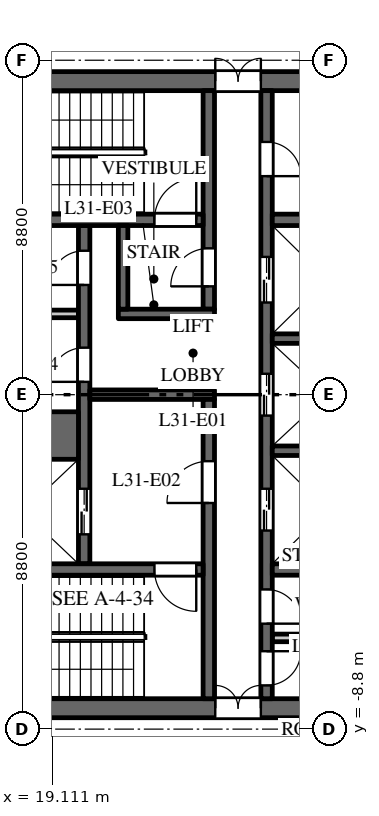
"""IFC4 building model, lengths in metres.
Left out: names, types, materials, properties, quantities, classifications, styles, units other than length and angle.
Written with IfcOpenShell. Run it as: python <this file> out.ifc"""

import sys

from ifc_helpers import new_model, si_unit, direction, frame, frame_2d, origin, place, context, subcontext, project, spatial, rectangle, extrude, element, fill, save


model = new_model("IFC4")
c1 = context("Model", 3, precision=1e-05, world=origin(), true_north=direction((0.0, 1.0)))
c2 = subcontext(c1, "Body", "Model", "MODEL_VIEW")
j1 = project(units=[si_unit("LENGTHUNIT", "METRE"), si_unit("PLANEANGLEUNIT", "RADIAN")], contexts=[c1])
p1 = place(None, origin())
s1 = spatial("IfcSite", under=j1, at=p1, CompositionType="ELEMENT")
p2 = place(p1, origin())
s2 = spatial("IfcBuilding", under=s1, at=p2, CompositionType="ELEMENT")
p3 = place(p2, frame((0.0, 0.0, 136.0)))
s3 = spatial("IfcBuildingStorey", under=s2, at=p3, CompositionType="ELEMENT", Elevation=136.0)
p4 = place(p3, frame((16.5, 8.25, 0.0), z_axis=(0.0, 0.0, 1.0), x_axis=(1.0, 0.0, 0.0)))
e1 = element("IfcWall", 1, at=p4, inside=s3, PredefinedType="SHEAR", context=c2, shape_type="SweptSolid", body=[
    extrude(rectangle(XDim=15.0, YDim=0.5, at=frame_2d((7.5, 0.0))), origin(), (0.0, 0.0, 1.0), 3.7),
])
p5 = place(p4, frame((6.9, 0.0, 0.0)))
e2 = element("IfcOpeningElement", 2, at=p5, cuts=e1, PredefinedType="OPENING", context=c2, shape_type="SweptSolid", body=[
    extrude(rectangle(XDim=1.2, YDim=2.1, at=frame_2d((0.6, 1.05))), frame((0.0, 0.26, 0.0), z_axis=(0.0, -1.0, 0.0), x_axis=(1.0, 0.0, 0.0)), (0.0, 0.0, 1.0), 0.52),
])
p6 = place(p4, frame((12.95, 0.0, 0.0)))
e3 = element("IfcOpeningElement", 3, at=p6, cuts=e1, PredefinedType="OPENING", context=c2, shape_type="SweptSolid", body=[
    extrude(rectangle(XDim=0.9, YDim=2.1, at=frame_2d((0.45, 1.05))), frame((0.0, 0.26, 0.0), z_axis=(0.0, -1.0, 0.0), x_axis=(1.0, 0.0, 0.0)), (0.0, 0.0, 1.0), 0.52),
])
p7 = place(p3, frame((16.5, -8.25, 0.0), z_axis=(0.0, 0.0, 1.0), x_axis=(1.0, 0.0, 0.0)))
e4 = element("IfcWall", 4, at=p7, inside=s3, PredefinedType="SHEAR", context=c2, shape_type="SweptSolid", body=[
    extrude(rectangle(XDim=15.0, YDim=0.5, at=frame_2d((7.5, 0.0))), origin(), (0.0, 0.0, 1.0), 3.7),
])
p8 = place(p7, frame((6.9, 0.0, 0.0)))
e5 = element("IfcOpeningElement", 5, at=p8, cuts=e4, PredefinedType="OPENING", context=c2, shape_type="SweptSolid", body=[
    extrude(rectangle(XDim=1.2, YDim=2.1, at=frame_2d((0.6, 1.05))), frame((0.0, 0.26, 0.0), z_axis=(0.0, -1.0, 0.0), x_axis=(1.0, 0.0, 0.0)), (0.0, 0.0, 1.0), 0.52),
])
p9 = place(p7, frame((12.275, 0.0, 0.0)))
e6 = element("IfcOpeningElement", 6, at=p9, cuts=e4, PredefinedType="OPENING", context=c2, shape_type="SweptSolid", body=[
    extrude(rectangle(XDim=0.9, YDim=2.1, at=frame_2d((0.45, 1.05))), frame((0.0, 0.26, 0.0), z_axis=(0.0, -1.0, 0.0), x_axis=(1.0, 0.0, 0.0)), (0.0, 0.0, 1.0), 0.52),
])
p10 = place(p3, frame((16.9, 2.125, 0.0), z_axis=(0.0, 0.0, 1.0), x_axis=(1.0, 0.0, 0.0)))
e7 = element("IfcWall", 7, at=p10, inside=s3, PredefinedType="PARTITIONING", context=c2, shape_type="SweptSolid", body=[
    extrude(rectangle(XDim=2.9, YDim=0.2, at=frame_2d((1.45, 0.0))), origin(), (0.0, 0.0, 1.0), 3.7),
])
p11 = place(p3, frame((19.95, -4.45, 0.0), z_axis=(0.0, 0.0, 1.0), x_axis=(0.0, 1.0, 0.0)))
e8 = element("IfcWall", 8, at=p11, inside=s3, PredefinedType="SHEAR", context=c2, shape_type="SweptSolid", body=[
    extrude(rectangle(XDim=8.9, YDim=0.3, at=frame_2d((4.45, 0.0))), origin(), (0.0, 0.0, 1.0), 3.7),
])
p12 = place(p11, frame((0.775, 0.0, 0.0)))
e9 = element("IfcOpeningElement", 9, at=p12, cuts=e8, PredefinedType="OPENING", context=c2, shape_type="SweptSolid", body=[
    extrude(rectangle(XDim=1.2, YDim=2.1, at=frame_2d((0.6, 1.05))), frame((0.0, 0.16, 0.0), z_axis=(0.0, -1.0, 0.0), x_axis=(1.0, 0.0, 0.0)), (0.0, 0.0, 1.0), 0.32),
])
p13 = place(p11, frame((4.788, 0.0, 0.0)))
e10 = element("IfcOpeningElement", 10, at=p13, cuts=e8, PredefinedType="OPENING", context=c2, shape_type="SweptSolid", body=[
    extrude(rectangle(XDim=0.9, YDim=2.1, at=frame_2d((0.45, 1.05))), frame((0.0, 0.16, 0.0), z_axis=(0.0, -1.0, 0.0), x_axis=(1.0, 0.0, 0.0)), (0.0, 0.0, 1.0), 0.32),
])
p14 = place(p11, frame((7.337, 0.0, 0.0)))
e11 = element("IfcOpeningElement", 11, at=p14, cuts=e8, PredefinedType="OPENING", context=c2, shape_type="SweptSolid", body=[
    extrude(rectangle(XDim=0.9, YDim=2.1, at=frame_2d((0.45, 1.05))), frame((0.0, 0.16, 0.0), z_axis=(0.0, -1.0, 0.0), x_axis=(1.0, 0.0, 0.0)), (0.0, 0.0, 1.0), 0.32),
])
p15 = place(p3, frame((24.75, -8.0, 0.0), z_axis=(0.0, 0.0, 1.0), x_axis=(0.0, 1.0, 0.0)))
e12 = element("IfcWall", 12, at=p15, inside=s3, PredefinedType="SHEAR", context=c2, shape_type="SweptSolid", body=[
    extrude(rectangle(XDim=16.0, YDim=0.3, at=frame_2d((8.0, 0.0))), origin(), (0.0, 0.0, 1.0), 3.7),
])
p16 = place(p15, frame((4.425, 0.0, 0.0)))
e13 = element("IfcOpeningElement", 13, at=p16, cuts=e12, PredefinedType="OPENING", context=c2, shape_type="SweptSolid", body=[
    extrude(rectangle(XDim=1.1, YDim=2.1, at=frame_2d((0.55, 1.05))), frame((0.0, 0.16, 0.0), z_axis=(0.0, -1.0, 0.0), x_axis=(1.0, 0.0, 0.0)), (0.0, 0.0, 1.0), 0.32),
])
p17 = place(p15, frame((7.45, 0.0, 0.0)))
e14 = element("IfcOpeningElement", 14, at=p17, cuts=e12, PredefinedType="OPENING", context=c2, shape_type="SweptSolid", body=[
    extrude(rectangle(XDim=1.1, YDim=2.1, at=frame_2d((0.55, 1.05))), frame((0.0, 0.16, 0.0), z_axis=(0.0, -1.0, 0.0), x_axis=(1.0, 0.0, 0.0)), (0.0, 0.0, 1.0), 0.32),
])
p18 = place(p15, frame((10.425, 0.0, 0.0)))
e15 = element("IfcOpeningElement", 15, at=p18, cuts=e12, PredefinedType="OPENING", context=c2, shape_type="SweptSolid", body=[
    extrude(rectangle(XDim=1.2, YDim=2.1, at=frame_2d((0.6, 1.05))), frame((0.0, 0.16, 0.0), z_axis=(0.0, -1.0, 0.0), x_axis=(1.0, 0.0, 0.0)), (0.0, 0.0, 1.0), 0.32),
])
p19 = place(p15, frame((13.75, 0.0, 0.0)))
e16 = element("IfcOpeningElement", 16, at=p19, cuts=e12, PredefinedType="OPENING", context=c2, shape_type="SweptSolid", body=[
    extrude(rectangle(XDim=0.9, YDim=2.1, at=frame_2d((0.45, 1.05))), frame((0.0, 0.16, 0.0), z_axis=(0.0, -1.0, 0.0), x_axis=(1.0, 0.0, 0.0)), (0.0, 0.0, 1.0), 0.32),
])
p20 = place(p15, frame((1.975, 0.0, 0.0)))
e17 = element("IfcOpeningElement", 17, at=p20, cuts=e12, PredefinedType="OPENING", context=c2, shape_type="SweptSolid", body=[
    extrude(rectangle(XDim=0.9, YDim=2.1, at=frame_2d((0.45, 1.05))), frame((0.0, 0.16, 0.0), z_axis=(0.0, -1.0, 0.0), x_axis=(1.0, 0.0, 0.0)), (0.0, 0.0, 1.0), 0.32),
])
p21 = place(p15, frame((0.35, 0.0, 0.0)))
e18 = element("IfcOpeningElement", 18, at=p21, cuts=e12, PredefinedType="OPENING", context=c2, shape_type="SweptSolid", body=[
    extrude(rectangle(XDim=0.9, YDim=2.1, at=frame_2d((0.45, 1.05))), frame((0.0, 0.16, 0.0), z_axis=(0.0, -1.0, 0.0), x_axis=(1.0, 0.0, 0.0)), (0.0, 0.0, 1.0), 0.32),
])
p22 = place(p3, frame((20.1, 0.0, 0.0), z_axis=(0.0, 0.0, 1.0), x_axis=(1.0, 0.0, 0.0)))
e19 = element("IfcWall", 19, at=p22, inside=s3, PredefinedType="SHEAR", context=c2, shape_type="SweptSolid", body=[
    extrude(rectangle(XDim=3.28, YDim=0.25, at=frame_2d((1.64, 0.0))), origin(), (0.0, 0.0, 1.0), 3.7),
])
p23 = place(p3, frame((24.9, 4.6, 0.0), z_axis=(0.0, 0.0, 1.0), x_axis=(1.0, 0.0, 0.0)))
e20 = element("IfcWall", 20, at=p23, inside=s3, PredefinedType="SHEAR", context=c2, shape_type="SweptSolid", body=[
    extrude(rectangle(XDim=6.1, YDim=0.3, at=frame_2d((3.05, 0.0))), origin(), (0.0, 0.0, 1.0), 3.7),
])
p24 = place(p23, frame((4.2, 0.0, 0.0)))
e21 = element("IfcOpeningElement", 21, at=p24, cuts=e20, PredefinedType="OPENING", context=c2, shape_type="SweptSolid", body=[
    extrude(rectangle(XDim=0.9, YDim=2.1, at=frame_2d((0.45, 1.05))), frame((0.0, 0.16, 0.0), z_axis=(0.0, -1.0, 0.0), x_axis=(1.0, 0.0, 0.0)), (0.0, 0.0, 1.0), 0.32),
])
p25 = place(p3, frame((24.9, -6.4, 0.0), z_axis=(0.0, 0.0, 1.0), x_axis=(1.0, 0.0, 0.0)))
e22 = element("IfcWall", 22, at=p25, inside=s3, PredefinedType="PARTITIONING", context=c2, shape_type="SweptSolid", body=[
    extrude(rectangle(XDim=2.35, YDim=0.2, at=frame_2d((1.175, 0.0))), origin(), (0.0, 0.0, 1.0), 3.7),
])
p26 = place(p3, frame((24.9, -4.6, 0.0), z_axis=(0.0, 0.0, 1.0), x_axis=(1.0, 0.0, 0.0)))
e23 = element("IfcWall", 23, at=p26, inside=s3, PredefinedType="SHEAR", context=c2, shape_type="SweptSolid", body=[
    extrude(rectangle(XDim=6.1, YDim=0.3, at=frame_2d((3.05, 0.0))), origin(), (0.0, 0.0, 1.0), 3.7),
])
p27 = place(p3, frame((16.9, -1.075, 0.0), z_axis=(0.0, 0.0, 1.0), x_axis=(1.0, 0.0, 0.0)))
e24 = element("IfcWall", 24, at=p27, inside=s3, PredefinedType="SHEAR", context=c2, shape_type="SweptSolid", body=[
    extrude(rectangle(XDim=2.9, YDim=1.25, at=frame_2d((1.45, 0.0))), origin(), (0.0, 0.0, 1.0), 3.7),
])
for number, where, z_axis, x_axis in (
    (25, (24.9, -1.475, 0.0), (0.0, 0.0, 1.0), (1.0, 0.0, 0.0)),
    (26, (24.9, 1.475, 0.0), (0.0, 0.0, 1.0), (1.0, 0.0, 0.0)),
):
    element("IfcWall", number, at=place(p3, frame(where, z_axis=z_axis, x_axis=x_axis)), inside=s3, PredefinedType="SHEAR", context=c2, shape_type="SweptSolid", body=[
        extrude(rectangle(XDim=2.9, YDim=0.25, at=frame_2d((1.45, 0.0))), origin(), (0.0, 0.0, 1.0), 3.7),
    ])
p28 = place(p3, frame((23.23, 2.25, 0.0), z_axis=(0.0, 0.0, 1.0), x_axis=(0.0, 1.0, 0.0)))
e27 = element("IfcWall", 27, at=p28, inside=s3, PredefinedType="SHEAR", context=c2, shape_type="SweptSolid", body=[
    extrude(rectangle(XDim=5.75, YDim=0.3, at=frame_2d((2.875, 0.0))), origin(), (0.0, 0.0, 1.0), 3.7),
])
p29 = place(p28, frame((0.6, 0.0, 0.0)))
e28 = element("IfcOpeningElement", 28, at=p29, cuts=e27, PredefinedType="OPENING", context=c2, shape_type="SweptSolid", body=[
    extrude(rectangle(XDim=1.0, YDim=2.1, at=frame_2d((0.5, 1.05))), frame((0.0, 0.16, 0.0), z_axis=(0.0, -1.0, 0.0), x_axis=(1.0, 0.0, 0.0)), (0.0, 0.0, 1.0), 0.32),
])
p30 = place(p3, frame((23.23, -8.0, 0.0), z_axis=(0.0, 0.0, 1.0), x_axis=(0.0, 1.0, 0.0)))
e29 = element("IfcWall", 29, at=p30, inside=s3, PredefinedType="SHEAR", context=c2, shape_type="SweptSolid", body=[
    extrude(rectangle(XDim=7.875, YDim=0.3, at=frame_2d((3.938, 0.0))), origin(), (0.0, 0.0, 1.0), 3.7),
])
p31 = place(p30, frame((5.15, 0.0, 0.0)))
e30 = element("IfcOpeningElement", 30, at=p31, cuts=e29, PredefinedType="OPENING", context=c2, shape_type="SweptSolid", body=[
    extrude(rectangle(XDim=1.1, YDim=2.1, at=frame_2d((0.55, 1.05))), frame((0.0, 0.16, 0.0), z_axis=(0.0, -1.0, 0.0), x_axis=(1.0, 0.0, 0.0)), (0.0, 0.0, 1.0), 0.32),
])
p32 = place(p3, frame((16.9, 4.6, 0.0), z_axis=(0.0, 0.0, 1.0), x_axis=(1.0, 0.0, 0.0)))
e31 = element("IfcWall", 31, at=p32, inside=s3, PredefinedType="SHEAR", context=c2, shape_type="SweptSolid", body=[
    extrude(rectangle(XDim=6.18, YDim=0.3, at=frame_2d((3.09, 0.0))), origin(), (0.0, 0.0, 1.0), 3.7),
])
p33 = place(p32, frame((4.9, 0.0, 0.0)))
e32 = element("IfcOpeningElement", 32, at=p33, cuts=e31, PredefinedType="OPENING", context=c2, shape_type="SweptSolid", body=[
    extrude(rectangle(XDim=1.1, YDim=2.1, at=frame_2d((0.55, 1.05))), frame((0.0, 0.16, 0.0), z_axis=(0.0, -1.0, 0.0), x_axis=(1.0, 0.0, 0.0)), (0.0, 0.0, 1.0), 0.32),
])
p34 = place(p3, frame((16.9, -4.6, 0.0), z_axis=(0.0, 0.0, 1.0), x_axis=(1.0, 0.0, 0.0)))
e33 = element("IfcWall", 33, at=p34, inside=s3, PredefinedType="SHEAR", context=c2, shape_type="SweptSolid", body=[
    extrude(rectangle(XDim=6.18, YDim=0.3, at=frame_2d((3.09, 0.0))), origin(), (0.0, 0.0, 1.0), 3.7),
])
p35 = place(p34, frame((4.9, 0.0, 0.0)))
e34 = element("IfcOpeningElement", 34, at=p35, cuts=e33, PredefinedType="OPENING", context=c2, shape_type="SweptSolid", body=[
    extrude(rectangle(XDim=1.1, YDim=2.1, at=frame_2d((0.55, 1.05))), frame((0.0, 0.16, 0.0), z_axis=(0.0, -1.0, 0.0), x_axis=(1.0, 0.0, 0.0)), (0.0, 0.0, 1.0), 0.32),
])
p36 = place(p3, frame((20.85, 2.125, 0.0), z_axis=(0.0, 0.0, 1.0), x_axis=(1.0, 0.0, 0.0)))
e35 = element("IfcWall", 35, at=p36, inside=s3, PredefinedType="SHEAR", context=c2, shape_type="SweptSolid", body=[
    extrude(rectangle(XDim=2.53, YDim=0.25, at=frame_2d((1.265, 0.0))), origin(), (0.0, 0.0, 1.0), 3.7),
])
p37 = place(p3, frame((20.975, 2.25, 0.0), z_axis=(0.0, 0.0, 1.0), x_axis=(0.0, 1.0, 0.0)))
e36 = element("IfcWall", 36, at=p37, inside=s3, PredefinedType="SHEAR", context=c2, shape_type="SweptSolid", body=[
    extrude(rectangle(XDim=2.2, YDim=0.25, at=frame_2d((1.1, 0.0))), origin(), (0.0, 0.0, 1.0), 3.7),
])
p38 = place(p12, origin())
e37 = element("IfcDoor", 37, at=p38, inside=s3, OperationType="DOUBLE_DOOR_SLIDING", PredefinedType="DOOR", context=c2, shape_type="SweptSolid", body=[
    extrude(rectangle(XDim=1.2, YDim=2.1, at=frame_2d((0.6, 1.05))), frame((0.0, 0.025, 0.0), z_axis=(0.0, -1.0, 0.0), x_axis=(1.0, 0.0, 0.0)), (0.0, 0.0, 1.0), 0.05),
])
fill(e9, e37)
p39 = place(p16, origin())
e38 = element("IfcDoor", 38, at=p39, inside=s3, OperationType="DOUBLE_DOOR_SLIDING", PredefinedType="DOOR", context=c2, shape_type="SweptSolid", body=[
    extrude(rectangle(XDim=1.1, YDim=2.1, at=frame_2d((0.55, 1.05))), frame((0.0, 0.025, 0.0), z_axis=(0.0, -1.0, 0.0), x_axis=(1.0, 0.0, 0.0)), (0.0, 0.0, 1.0), 0.05),
])
fill(e13, e38)
p40 = place(p17, origin())
e39 = element("IfcDoor", 39, at=p40, inside=s3, OperationType="DOUBLE_DOOR_SLIDING", PredefinedType="DOOR", context=c2, shape_type="SweptSolid", body=[
    extrude(rectangle(XDim=1.1, YDim=2.1, at=frame_2d((0.55, 1.05))), frame((0.0, 0.025, 0.0), z_axis=(0.0, -1.0, 0.0), x_axis=(1.0, 0.0, 0.0)), (0.0, 0.0, 1.0), 0.05),
])
fill(e14, e39)
p41 = place(p18, origin())
e40 = element("IfcDoor", 40, at=p41, inside=s3, OperationType="DOUBLE_DOOR_SLIDING", PredefinedType="DOOR", context=c2, shape_type="SweptSolid", body=[
    extrude(rectangle(XDim=1.2, YDim=2.1, at=frame_2d((0.6, 1.05))), frame((0.0, 0.025, 0.0), z_axis=(0.0, -1.0, 0.0), x_axis=(1.0, 0.0, 0.0)), (0.0, 0.0, 1.0), 0.05),
])
fill(e15, e40)
p42 = place(p33, origin())
e41 = element("IfcDoor", 41, at=p42, inside=s3, OperationType="SINGLE_SWING_LEFT", PredefinedType="DOOR", context=c2, shape_type="SweptSolid", body=[
    extrude(rectangle(XDim=1.1, YDim=2.1, at=frame_2d((0.55, 1.05))), frame((0.0, 0.025, 0.0), z_axis=(0.0, -1.0, 0.0), x_axis=(1.0, 0.0, 0.0)), (0.0, 0.0, 1.0), 0.05),
])
fill(e32, e41)
p43 = place(p35, origin())
e42 = element("IfcDoor", 42, at=p43, inside=s3, OperationType="SINGLE_SWING_RIGHT", PredefinedType="DOOR", context=c2, shape_type="SweptSolid", body=[
    extrude(rectangle(XDim=1.1, YDim=2.1, at=frame_2d((0.55, 1.05))), frame((0.0, 0.025, 0.0), z_axis=(0.0, -1.0, 0.0), x_axis=(1.0, 0.0, 0.0)), (0.0, 0.0, 1.0), 0.05),
])
fill(e34, e42)
p44 = place(p31, origin())
e43 = element("IfcDoor", 43, at=p44, inside=s3, OperationType="SINGLE_SWING_RIGHT", PredefinedType="DOOR", context=c2, shape_type="SweptSolid", body=[
    extrude(rectangle(XDim=1.1, YDim=2.1, at=frame_2d((0.55, 1.05))), frame((0.0, 0.025, 0.0), z_axis=(0.0, -1.0, 0.0), x_axis=(1.0, 0.0, 0.0)), (0.0, 0.0, 1.0), 0.05),
])
fill(e30, e43)
p45 = place(p29, origin())
e44 = element("IfcDoor", 44, at=p45, inside=s3, OperationType="SINGLE_SWING_RIGHT", PredefinedType="DOOR", context=c2, shape_type="SweptSolid", body=[
    extrude(rectangle(XDim=1.0, YDim=2.1, at=frame_2d((0.5, 1.05))), frame((0.0, 0.025, 0.0), z_axis=(0.0, -1.0, 0.0), x_axis=(1.0, 0.0, 0.0)), (0.0, 0.0, 1.0), 0.05),
])
fill(e28, e44)
p46 = place(p5, origin())
e45 = element("IfcDoor", 45, at=p46, inside=s3, OperationType="DOUBLE_DOOR_DOUBLE_SWING", PredefinedType="DOOR", context=c2, shape_type="SweptSolid", body=[
    extrude(rectangle(XDim=1.2, YDim=2.1, at=frame_2d((0.6, 1.05))), frame((0.0, 0.025, 0.0), z_axis=(0.0, -1.0, 0.0), x_axis=(1.0, 0.0, 0.0)), (0.0, 0.0, 1.0), 0.05),
])
fill(e2, e45)
p47 = place(p8, origin())
e46 = element("IfcDoor", 46, at=p47, inside=s3, OperationType="DOUBLE_DOOR_DOUBLE_SWING", PredefinedType="DOOR", context=c2, shape_type="SweptSolid", body=[
    extrude(rectangle(XDim=1.2, YDim=2.1, at=frame_2d((0.6, 1.05))), frame((0.0, 0.025, 0.0), z_axis=(0.0, -1.0, 0.0), x_axis=(1.0, 0.0, 0.0)), (0.0, 0.0, 1.0), 0.05),
])
fill(e5, e46)
p48 = place(p13, origin())
e47 = element("IfcDoor", 47, at=p48, inside=s3, OperationType="SINGLE_SWING_RIGHT", PredefinedType="DOOR", context=c2, shape_type="SweptSolid", body=[
    extrude(rectangle(XDim=0.9, YDim=2.1, at=frame_2d((0.45, 1.05))), frame((0.0, 0.025, 0.0), z_axis=(0.0, -1.0, 0.0), x_axis=(1.0, 0.0, 0.0)), (0.0, 0.0, 1.0), 0.05),
])
fill(e10, e47)
p49 = place(p14, origin())
e48 = element("IfcDoor", 48, at=p49, inside=s3, OperationType="SINGLE_SWING_RIGHT", PredefinedType="DOOR", context=c2, shape_type="SweptSolid", body=[
    extrude(rectangle(XDim=0.9, YDim=2.1, at=frame_2d((0.45, 1.05))), frame((0.0, 0.025, 0.0), z_axis=(0.0, -1.0, 0.0), x_axis=(1.0, 0.0, 0.0)), (0.0, 0.0, 1.0), 0.05),
])
fill(e11, e48)
p50 = place(p19, origin())
e49 = element("IfcDoor", 49, at=p50, inside=s3, OperationType="SINGLE_SWING_LEFT", PredefinedType="DOOR", context=c2, shape_type="SweptSolid", body=[
    extrude(rectangle(XDim=0.9, YDim=2.1, at=frame_2d((0.45, 1.05))), frame((0.0, 0.025, 0.0), z_axis=(0.0, -1.0, 0.0), x_axis=(1.0, 0.0, 0.0)), (0.0, 0.0, 1.0), 0.05),
])
fill(e16, e49)
p51 = place(p20, origin())
e50 = element("IfcDoor", 50, at=p51, inside=s3, OperationType="SINGLE_SWING_LEFT", PredefinedType="DOOR", context=c2, shape_type="SweptSolid", body=[
    extrude(rectangle(XDim=0.9, YDim=2.1, at=frame_2d((0.45, 1.05))), frame((0.0, 0.025, 0.0), z_axis=(0.0, -1.0, 0.0), x_axis=(1.0, 0.0, 0.0)), (0.0, 0.0, 1.0), 0.05),
])
fill(e17, e50)
p52 = place(p21, origin())
e51 = element("IfcDoor", 51, at=p52, inside=s3, OperationType="SINGLE_SWING_RIGHT", PredefinedType="DOOR", context=c2, shape_type="SweptSolid", body=[
    extrude(rectangle(XDim=0.9, YDim=2.1, at=frame_2d((0.45, 1.05))), frame((0.0, 0.025, 0.0), z_axis=(0.0, -1.0, 0.0), x_axis=(1.0, 0.0, 0.0)), (0.0, 0.0, 1.0), 0.05),
])
fill(e18, e51)
save(model, sys.argv[1])
